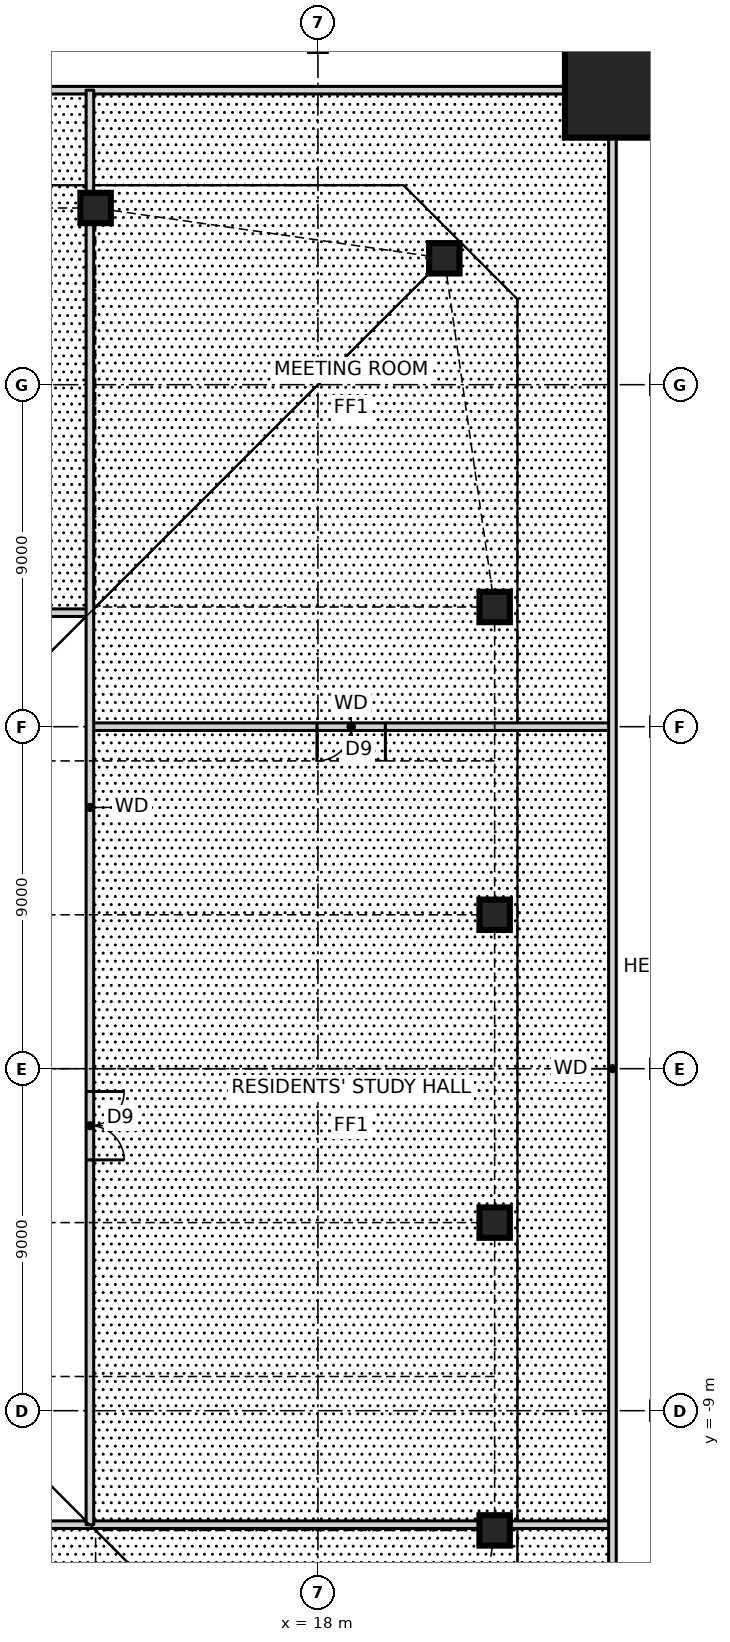
"""IFC4 building model, lengths in metres.
Left out: names, types, materials, properties, quantities, classifications, styles, units other than length and angle.
Written with IfcOpenShell. Run it as: python <this file> out.ifc"""

import sys

from ifc_helpers import new_model, si_unit, direction, frame, frame_2d, origin, origin_2d, place, context, subcontext, project, spatial, rectangle, hollow_rectangle, i_section, extrude, element, fill, save


model = new_model("IFC4")
c1 = context("Model", 3, precision=1e-05, world=origin(), true_north=direction((0.0, 1.0)))
c2 = subcontext(c1, "Body", "Model", "MODEL_VIEW")
j1 = project(units=[si_unit("LENGTHUNIT", "METRE"), si_unit("PLANEANGLEUNIT", "RADIAN")], contexts=[c1])
p1 = place(None, origin())
s1 = spatial("IfcSite", under=j1, at=p1, CompositionType="ELEMENT")
p2 = place(p1, origin())
s2 = spatial("IfcBuilding", under=s1, at=p2, CompositionType="ELEMENT")
p3 = place(p2, frame((0.0, 0.0, 6.0)))
s3 = spatial("IfcBuildingStorey", under=s2, at=p3, CompositionType="ELEMENT", Elevation=6.0)
for number, where, z_axis, x_axis in (
    (1, (22.65, -12.15, 0.0), (0.0, 0.0, 1.0), (1.0, 0.0, 0.0)),
    (2, (22.65, -4.05, 0.0), (0.0, 0.0, 1.0), (1.0, 0.0, 0.0)),
    (3, (22.65, 4.05, 0.0), (0.0, 0.0, 1.0), (1.0, 0.0, 0.0)),
    (4, (22.65, 12.15, 0.0), (0.0, 0.0, 1.0), (1.0, 0.0, 0.0)),
    (5, (21.326, 21.326, 0.0), (0.0, 0.0, 1.0), (1.0, 0.0, 0.0)),
    (6, (12.15, 22.65, 0.0), (0.0, 0.0, 1.0), (1.0, 0.0, 0.0)),
):
    element("IfcColumn", number, at=place(p3, frame(where, z_axis=z_axis, x_axis=x_axis)), inside=s3, PredefinedType="COLUMN", context=c2, shape_type="SweptSolid", body=[
        extrude(hollow_rectangle(XDim=0.8, YDim=0.8, WallThickness=0.09, at=origin_2d()), origin(), (0.0, 0.0, 1.0), 4.5),
    ])
p4 = place(p3, frame((27.0, 27.0, 0.0), z_axis=(0.0, 0.0, 1.0), x_axis=(1.0, 0.0, 0.0)))
e7 = element("IfcColumn", 7, at=p4, inside=s3, PredefinedType="COLUMN", context=c2, shape_type="SweptSolid", body=[
    extrude(rectangle(XDim=5.0, YDim=5.0, at=origin_2d()), origin(), (0.0, 0.0, 1.0), 4.5),
    extrude(i_section(OverallWidth=0.478, OverallDepth=0.599, WebThickness=0.1, FlangeThickness=0.14, at=origin_2d()), origin(), (0.0, 0.0, 1.0), 4.5),
])
p5 = place(p3, frame((-12.0, -12.0, 0.0), z_axis=(0.0, 0.0, 1.0), x_axis=(1.0, 0.0, 0.0)))
e8 = element("IfcWall", 8, at=p5, inside=s3, PredefinedType="SOLIDWALL", context=c2, shape_type="SweptSolid", body=[
    extrude(rectangle(XDim=37.75, YDim=0.2, at=frame_2d((18.875, 0.0))), origin(), (0.0, 0.0, 1.0), 4.25),
])
p6 = place(p5, frame((10.1, 0.0, 0.0)))
e9 = element("IfcOpeningElement", 9, at=p6, cuts=e8, PredefinedType="OPENING", context=c2, shape_type="SweptSolid", body=[
    extrude(rectangle(XDim=1.8, YDim=2.1, at=frame_2d((0.9, 1.05))), frame((0.0, 0.11, 0.0), z_axis=(0.0, -1.0, 0.0), x_axis=(1.0, 0.0, 0.0)), (0.0, 0.0, 1.0), 0.22),
])
p7 = place(p5, frame((0.25, 0.0, 0.0)))
e10 = element("IfcOpeningElement", 10, at=p7, cuts=e8, PredefinedType="OPENING", context=c2, shape_type="SweptSolid", body=[
    extrude(rectangle(XDim=1.8, YDim=2.1, at=frame_2d((0.9, 1.05))), frame((0.0, 0.11, 0.0), z_axis=(0.0, -1.0, 0.0), x_axis=(1.0, 0.0, 0.0)), (0.0, 0.0, 1.0), 0.22),
])
p8 = place(p3, frame((12.0, 9.0, 0.0), z_axis=(0.0, 0.0, 1.0), x_axis=(1.0, 0.0, 0.0)))
e11 = element("IfcWall", 11, at=p8, inside=s3, PredefinedType="SOLIDWALL", context=c2, shape_type="SweptSolid", body=[
    extrude(rectangle(XDim=13.75, YDim=0.2, at=frame_2d((6.875, 0.0))), origin(), (0.0, 0.0, 1.0), 4.25),
])
p9 = place(p8, frame((5.975, 0.0, 0.0)))
e12 = element("IfcOpeningElement", 12, at=p9, cuts=e11, PredefinedType="OPENING", context=c2, shape_type="SweptSolid", body=[
    extrude(rectangle(XDim=1.8, YDim=2.1, at=frame_2d((0.9, 1.05))), frame((0.0, 0.11, 0.0), z_axis=(0.0, -1.0, 0.0), x_axis=(1.0, 0.0, 0.0)), (0.0, 0.0, 1.0), 0.22),
])
p10 = place(p3, frame((-25.75, 12.0, 0.0), z_axis=(0.0, 0.0, 1.0), x_axis=(1.0, 0.0, 0.0)))
e13 = element("IfcWall", 13, at=p10, inside=s3, PredefinedType="SOLIDWALL", context=c2, shape_type="SweptSolid", body=[
    extrude(rectangle(XDim=37.75, YDim=0.2, at=frame_2d((18.875, 0.0))), origin(), (0.0, 0.0, 1.0), 4.25),
])
p11 = place(p10, frame((25.85, 0.0, 0.0)))
e14 = element("IfcOpeningElement", 14, at=p11, cuts=e13, PredefinedType="OPENING", context=c2, shape_type="SweptSolid", body=[
    extrude(rectangle(XDim=1.8, YDim=2.1, at=frame_2d((0.9, 1.05))), frame((0.0, 0.11, 0.0), z_axis=(0.0, -1.0, 0.0), x_axis=(1.0, 0.0, 0.0)), (0.0, 0.0, 1.0), 0.22),
])
for number, where, z_axis, x_axis in (
    (15, (-25.75, 25.75, 0.0), (0.0, 0.0, 1.0), (1.0, 0.0, 0.0)),
    (16, (25.75, -25.75, 0.0), (0.0, 0.0, 1.0), (0.0, 1.0, 0.0)),
):
    element("IfcWall", number, at=place(p3, frame(where, z_axis=z_axis, x_axis=x_axis)), inside=s3, PredefinedType="SOLIDWALL", context=c2, shape_type="SweptSolid", body=[
        extrude(rectangle(XDim=51.5, YDim=0.2, at=frame_2d((25.75, 0.0))), origin(), (0.0, 0.0, 1.0), 4.25),
    ])
p12 = place(p3, frame((12.0, -12.0, 0.0), z_axis=(0.0, 0.0, 1.0), x_axis=(0.0, 1.0, 0.0)))
e17 = element("IfcWall", 17, at=p12, inside=s3, PredefinedType="SOLIDWALL", context=c2, shape_type="SweptSolid", body=[
    extrude(rectangle(XDim=37.75, YDim=0.2, at=frame_2d((18.875, 0.0))), origin(), (0.0, 0.0, 1.0), 4.25),
])
p13 = place(p12, frame((9.6, 0.0, 0.0)))
e18 = element("IfcOpeningElement", 18, at=p13, cuts=e17, PredefinedType="OPENING", context=c2, shape_type="SweptSolid", body=[
    extrude(rectangle(XDim=1.8, YDim=2.1, at=frame_2d((0.9, 1.05))), frame((0.0, 0.11, 0.0), z_axis=(0.0, -1.0, 0.0), x_axis=(1.0, 0.0, 0.0)), (0.0, 0.0, 1.0), 0.22),
])
p14 = place(p13, frame((1.8, 0.0, 0.0), z_axis=(0.0, 0.0, 1.0), x_axis=(-1.0, 0.0, 0.0)))
e19 = element("IfcDoor", 19, at=p14, inside=s3, OperationType="DOUBLE_DOOR_SINGLE_SWING", PredefinedType="DOOR", context=c2, shape_type="SweptSolid", body=[
    extrude(rectangle(XDim=1.8, YDim=2.1, at=frame_2d((0.9, 1.05))), frame((0.0, 0.025, 0.0), z_axis=(0.0, -1.0, 0.0), x_axis=(1.0, 0.0, 0.0)), (0.0, 0.0, 1.0), 0.05),
])
fill(e18, e19)
p15 = place(p9, frame((1.8, 0.0, 0.0), z_axis=(0.0, 0.0, 1.0), x_axis=(-1.0, 0.0, 0.0)))
e20 = element("IfcDoor", 20, at=p15, inside=s3, OperationType="DOUBLE_DOOR_SINGLE_SWING", PredefinedType="DOOR", context=c2, shape_type="SweptSolid", body=[
    extrude(rectangle(XDim=1.8, YDim=2.1, at=frame_2d((0.9, 1.05))), frame((0.0, 0.025, 0.0), z_axis=(0.0, -1.0, 0.0), x_axis=(1.0, 0.0, 0.0)), (0.0, 0.0, 1.0), 0.05),
])
fill(e12, e20)
save(model, sys.argv[1])
